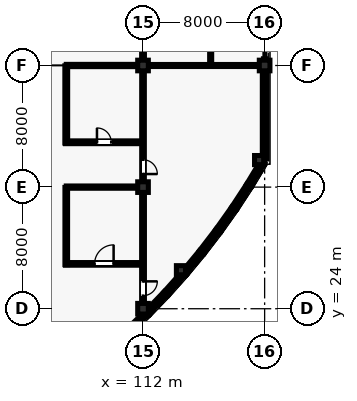
"""IFC4 building model, lengths in metres.
Left out: names, types, materials, properties, quantities, classifications, styles, units other than length and angle.
Written with IfcOpenShell. Run it as: python <this file> out.ifc"""

import sys

from ifc_helpers import new_model, si_unit, direction, frame, frame_2d, origin, origin_2d, place, context, subcontext, project, spatial, rectangle, extrude, element, fill, save


model = new_model("IFC4")
c1 = context("Model", 3, precision=1e-05, world=origin(), true_north=direction((0.0, 1.0)))
c2 = subcontext(c1, "Body", "Model", "MODEL_VIEW")
j1 = project(units=[si_unit("LENGTHUNIT", "METRE"), si_unit("PLANEANGLEUNIT", "RADIAN")], contexts=[c1])
p1 = place(None, origin())
s1 = spatial("IfcSite", under=j1, at=p1, CompositionType="ELEMENT")
p2 = place(p1, origin())
s2 = spatial("IfcBuilding", under=s1, at=p2, CompositionType="ELEMENT")
p3 = place(p2, origin())
s3 = spatial("IfcBuildingStorey", under=s2, at=p3, CompositionType="ELEMENT", Elevation=0.0)
for number, where, z_axis, x_axis in (
    (1, (112.0, 24.0, 0.0), (0.0, 0.0, 1.0), (1.0, 0.0, 0.0)),
    (2, (112.0, 32.0, 0.0), (0.0, 0.0, 1.0), (1.0, 0.0, 0.0)),
    (3, (112.0, 40.0, 0.0), (0.0, 0.0, 1.0), (1.0, 0.0, 0.0)),
    (4, (120.0, 40.0, 0.0), (0.0, 0.0, 1.0), (1.0, 0.0, 0.0)),
):
    element("IfcColumn", number, at=place(p3, frame(where, z_axis=z_axis, x_axis=x_axis)), inside=s3, PredefinedType="COLUMN", context=c2, shape_type="SweptSolid", body=[
        extrude(rectangle(XDim=0.7, YDim=0.7, at=origin_2d()), origin(), (0.0, 0.0, 1.0), 5.28),
    ])
for number, where, z_axis, x_axis in (
    (5, (114.495, 26.533, 0.0), (0.0, 0.0, 1.0), (1.0, 0.0, 0.0)),
    (6, (119.636, 33.779, 0.0), (0.0, 0.0, 1.0), (1.0, 0.0, 0.0)),
):
    element("IfcColumn", number, at=place(p3, frame(where, z_axis=z_axis, x_axis=x_axis)), inside=s3, PredefinedType="COLUMN", context=c2, shape_type="SweptSolid", body=[
        extrude(rectangle(XDim=0.6, YDim=0.6, at=origin_2d()), origin(), (0.0, 0.0, 1.0), 5.28),
    ])
p4 = place(p3, frame((110.971, 22.494, 0.0), z_axis=(0.0, 0.0, 1.0), x_axis=(0.720242191926, 0.693722700342, 0.0)))
e7 = element("IfcWall", 7, at=p4, inside=s3, PredefinedType="SOLIDWALL", context=c2, shape_type="SweptSolid", body=[
    extrude(rectangle(XDim=1.795, YDim=0.305, at=frame_2d((0.897, 0.0))), origin(), (0.0, 0.0, 1.0), 5.035),
])
p5 = place(p4, frame((0.347, 0.0, 0.9)))
e8 = element("IfcOpeningElement", 8, at=p5, cuts=e7, PredefinedType="OPENING", context=c2, shape_type="SweptSolid", body=[
    extrude(rectangle(XDim=1.1, YDim=2.1, at=frame_2d((0.55, 1.05))), frame((0.0, 0.162, 0.0), z_axis=(0.0, -1.0, 0.0), x_axis=(1.0, 0.0, 0.0)), (0.0, 0.0, 1.0), 0.325),
])
p6 = place(p3, frame((112.26, 23.736, 0.0), z_axis=(0.0, 0.0, 1.0), x_axis=(0.693722700342, 0.720242191926, 0.0)))
e9 = element("IfcWall", 9, at=p6, inside=s3, PredefinedType="SOLIDWALL", context=c2, shape_type="SweptSolid", body=[
    extrude(rectangle(XDim=1.795, YDim=0.305, at=frame_2d((0.897, 0.0))), origin(), (0.0, 0.0, 1.0), 5.035),
])
p7 = place(p6, frame((0.347, 0.0, 0.9)))
e10 = element("IfcOpeningElement", 10, at=p7, cuts=e9, PredefinedType="OPENING", context=c2, shape_type="SweptSolid", body=[
    extrude(rectangle(XDim=1.1, YDim=2.1, at=frame_2d((0.55, 1.05))), frame((0.0, 0.162, 0.0), z_axis=(0.0, -1.0, 0.0), x_axis=(1.0, 0.0, 0.0)), (0.0, 0.0, 1.0), 0.325),
])
p8 = place(p3, frame((113.502, 25.024, 0.0), z_axis=(0.0, 0.0, 1.0), x_axis=(0.666277888361, 0.745703543965, 0.0)))
e11 = element("IfcWall", 11, at=p8, inside=s3, PredefinedType="SOLIDWALL", context=c2, shape_type="SweptSolid", body=[
    extrude(rectangle(XDim=1.795, YDim=0.305, at=frame_2d((0.897, 0.0))), origin(), (0.0, 0.0, 1.0), 5.035),
])
p9 = place(p3, frame((114.694, 26.358, 0.0), z_axis=(0.0, 0.0, 1.0), x_axis=(0.638054732073, 0.769991012207, 0.0)))
e12 = element("IfcWall", 12, at=p9, inside=s3, PredefinedType="SOLIDWALL", context=c2, shape_type="SweptSolid", body=[
    extrude(rectangle(XDim=1.795, YDim=0.305, at=frame_2d((0.897, 0.0))), origin(), (0.0, 0.0, 1.0), 5.035),
])
p10 = place(p3, frame((115.836, 27.736, 0.0), z_axis=(0.0, 0.0, 1.0), x_axis=(0.608776981616, 0.793341406114, 0.0)))
e13 = element("IfcWall", 13, at=p10, inside=s3, PredefinedType="SOLIDWALL", context=c2, shape_type="SweptSolid", body=[
    extrude(rectangle(XDim=1.795, YDim=0.305, at=frame_2d((0.897, 0.0))), origin(), (0.0, 0.0, 1.0), 5.035),
])
p11 = place(p10, frame((0.347, 0.0, 0.9)))
e14 = element("IfcOpeningElement", 14, at=p11, cuts=e13, PredefinedType="OPENING", context=c2, shape_type="SweptSolid", body=[
    extrude(rectangle(XDim=1.1, YDim=2.1, at=frame_2d((0.55, 1.05))), frame((0.0, 0.162, 0.0), z_axis=(0.0, -1.0, 0.0), x_axis=(1.0, 0.0, 0.0)), (0.0, 0.0, 1.0), 0.325),
])
p12 = place(p3, frame((116.925, 29.156, 0.0), z_axis=(0.0, 0.0, 1.0), x_axis=(0.578662393636, 0.815567185578, 0.0)))
e15 = element("IfcWall", 15, at=p12, inside=s3, PredefinedType="SOLIDWALL", context=c2, shape_type="SweptSolid", body=[
    extrude(rectangle(XDim=1.795, YDim=0.305, at=frame_2d((0.897, 0.0))), origin(), (0.0, 0.0, 1.0), 5.035),
])
p13 = place(p12, frame((0.348, 0.0, 0.9)))
e16 = element("IfcOpeningElement", 16, at=p13, cuts=e15, PredefinedType="OPENING", context=c2, shape_type="SweptSolid", body=[
    extrude(rectangle(XDim=1.1, YDim=2.1, at=frame_2d((0.55, 1.05))), frame((0.0, 0.162, 0.0), z_axis=(0.0, -1.0, 0.0), x_axis=(1.0, 0.0, 0.0)), (0.0, 0.0, 1.0), 0.325),
])
p14 = place(p3, frame((117.961, 30.615, 0.0), z_axis=(0.0, 0.0, 1.0), x_axis=(0.547681678944, 0.836686786408, 0.0)))
e17 = element("IfcWall", 17, at=p14, inside=s3, PredefinedType="SOLIDWALL", context=c2, shape_type="SweptSolid", body=[
    extrude(rectangle(XDim=1.795, YDim=0.305, at=frame_2d((0.897, 0.0))), origin(), (0.0, 0.0, 1.0), 5.035),
])
p15 = place(p14, frame((0.347, 0.0, 0.9)))
e18 = element("IfcOpeningElement", 18, at=p15, cuts=e17, PredefinedType="OPENING", context=c2, shape_type="SweptSolid", body=[
    extrude(rectangle(XDim=1.1, YDim=2.1, at=frame_2d((0.55, 1.05))), frame((0.0, 0.162, 0.0), z_axis=(0.0, -1.0, 0.0), x_axis=(1.0, 0.0, 0.0)), (0.0, 0.0, 1.0), 0.325),
])
p16 = place(p3, frame((118.941, 32.112, 0.0), z_axis=(0.0, 0.0, 1.0), x_axis=(0.51607516088, 0.856543302071, 0.0)))
e19 = element("IfcWall", 19, at=p16, inside=s3, PredefinedType="SOLIDWALL", context=c2, shape_type="SweptSolid", body=[
    extrude(rectangle(XDim=1.795, YDim=0.305, at=frame_2d((0.897, 0.0))), origin(), (0.0, 0.0, 1.0), 5.035),
])
p17 = place(p3, frame((120.0, 33.854, 0.0), z_axis=(0.0, 0.0, 1.0), x_axis=(0.0, 1.0, 0.0)))
e20 = element("IfcWall", 20, at=p17, inside=s3, PredefinedType="SOLIDWALL", context=c2, shape_type="SweptSolid", body=[
    extrude(rectangle(XDim=5.811, YDim=0.305, at=frame_2d((2.905, 0.0))), origin(), (0.0, 0.0, 1.0), 5.035),
])
p18 = place(p17, frame((1.98, 0.0, 0.9)))
e21 = element("IfcOpeningElement", 21, at=p18, cuts=e20, PredefinedType="OPENING", context=c2, shape_type="SweptSolid", body=[
    extrude(rectangle(XDim=1.85, YDim=2.65, at=frame_2d((0.925, 1.325))), frame((0.0, 0.162, 0.0), z_axis=(0.0, -1.0, 0.0), x_axis=(1.0, 0.0, 0.0)), (0.0, 0.0, 1.0), 0.325),
])
p19 = place(p3, frame((106.9, 26.95, 0.0), z_axis=(0.0, 0.0, 1.0), x_axis=(1.0, 0.0, 0.0)))
e22 = element("IfcWall", 22, at=p19, inside=s3, PredefinedType="PARTITIONING", context=c2, shape_type="SweptSolid", body=[
    extrude(rectangle(XDim=5.08, YDim=0.175, at=frame_2d((2.54, 0.0))), origin(), (0.0, 0.0, 1.0), 4.412),
])
p20 = place(p19, frame((1.915, 0.0, 0.0)))
e23 = element("IfcOpeningElement", 23, at=p20, cuts=e22, PredefinedType="OPENING", context=c2, shape_type="SweptSolid", body=[
    extrude(rectangle(XDim=1.25, YDim=2.18, at=frame_2d((0.625, 1.09))), frame((0.0, 0.097, 0.0), z_axis=(0.0, -1.0, 0.0), x_axis=(1.0, 0.0, 0.0)), (0.0, 0.0, 1.0), 0.195),
])
p21 = place(p3, frame((106.95, 26.9, 0.0), z_axis=(0.0, 0.0, 1.0), x_axis=(0.0, 1.0, 0.0)))
e24 = element("IfcWall", 24, at=p21, inside=s3, PredefinedType="PARTITIONING", context=c2, shape_type="SweptSolid", body=[
    extrude(rectangle(XDim=5.08, YDim=0.175, at=frame_2d((2.54, 0.0))), origin(), (0.0, 0.0, 1.0), 4.403),
])
p22 = place(p3, frame((106.95, 32.0, 0.0), z_axis=(0.0, 0.0, 1.0), x_axis=(1.0, 0.0, 0.0)))
e25 = element("IfcWall", 25, at=p22, inside=s3, PredefinedType="PARTITIONING", context=c2, shape_type="SweptSolid", body=[
    extrude(rectangle(XDim=4.69, YDim=0.15, at=frame_2d((2.345, 0.0))), origin(), (0.0, 0.0, 1.0), 4.403),
])
p23 = place(p3, frame((106.9, 34.95, 0.0), z_axis=(0.0, 0.0, 1.0), x_axis=(1.0, 0.0, 0.0)))
e26 = element("IfcWall", 26, at=p23, inside=s3, PredefinedType="PARTITIONING", context=c2, shape_type="SweptSolid", body=[
    extrude(rectangle(XDim=5.08, YDim=0.185, at=frame_2d((2.54, 0.0))), origin(), (0.0, 0.0, 1.0), 4.404),
])
p24 = place(p23, frame((2.07, 0.0, 0.0)))
e27 = element("IfcOpeningElement", 27, at=p24, cuts=e26, PredefinedType="OPENING", context=c2, shape_type="SweptSolid", body=[
    extrude(rectangle(XDim=0.94, YDim=2.12, at=frame_2d((0.47, 1.06))), frame((0.0, 0.103, 0.0), z_axis=(0.0, -1.0, 0.0), x_axis=(1.0, 0.0, 0.0)), (0.0, 0.0, 1.0), 0.205),
])
p25 = place(p3, frame((106.95, 34.9, 0.0), z_axis=(0.0, 0.0, 1.0), x_axis=(0.0, 1.0, 0.0)))
e28 = element("IfcWall", 28, at=p25, inside=s3, PredefinedType="PARTITIONING", context=c2, shape_type="SweptSolid", body=[
    extrude(rectangle(XDim=5.08, YDim=0.185, at=frame_2d((2.54, 0.0))), origin(), (0.0, 0.0, 1.0), 4.336),
])
p26 = place(p3, frame((106.95, 40.0, 0.0), z_axis=(0.0, 0.0, 1.0), x_axis=(1.0, 0.0, 0.0)))
e29 = element("IfcWall", 29, at=p26, inside=s3, PredefinedType="PARTITIONING", context=c2, shape_type="SweptSolid", body=[
    extrude(rectangle(XDim=4.69, YDim=0.15, at=frame_2d((2.345, 0.0))), origin(), (0.0, 0.0, 1.0), 4.336),
])
p27 = place(p3, frame((112.0, 24.34, 0.0), z_axis=(0.0, 0.0, 1.0), x_axis=(0.0, 1.0, 0.0)))
e30 = element("IfcWall", 30, at=p27, inside=s3, PredefinedType="PARTITIONING", context=c2, shape_type="SweptSolid", body=[
    extrude(rectangle(XDim=7.32, YDim=0.185, at=frame_2d((3.66, 0.0))), origin(), (0.0, 0.0, 1.0), 4.412),
])
p28 = place(p27, frame((0.52, 0.0, 0.0)))
e31 = element("IfcOpeningElement", 31, at=p28, cuts=e30, PredefinedType="OPENING", context=c2, shape_type="SweptSolid", body=[
    extrude(rectangle(XDim=0.94, YDim=2.12, at=frame_2d((0.47, 1.06))), frame((0.0, 0.103, 0.0), z_axis=(0.0, -1.0, 0.0), x_axis=(1.0, 0.0, 0.0)), (0.0, 0.0, 1.0), 0.205),
])
p29 = place(p3, frame((112.0, 32.34, 0.0), z_axis=(0.0, 0.0, 1.0), x_axis=(0.0, 1.0, 0.0)))
e32 = element("IfcWall", 32, at=p29, inside=s3, PredefinedType="PARTITIONING", context=c2, shape_type="SweptSolid", body=[
    extrude(rectangle(XDim=7.32, YDim=0.175, at=frame_2d((3.66, 0.0))), origin(), (0.0, 0.0, 1.0), 4.404),
])
p30 = place(p29, frame((0.52, 0.0, 0.0)))
e33 = element("IfcOpeningElement", 33, at=p30, cuts=e32, PredefinedType="OPENING", context=c2, shape_type="SweptSolid", body=[
    extrude(rectangle(XDim=0.94, YDim=2.12, at=frame_2d((0.47, 1.06))), frame((0.0, 0.097, 0.0), z_axis=(0.0, -1.0, 0.0), x_axis=(1.0, 0.0, 0.0)), (0.0, 0.0, 1.0), 0.195),
])
p31 = place(p3, frame((112.0, 40.34, 0.0), z_axis=(0.0, 0.0, 1.0), x_axis=(0.0, 1.0, 0.0)))
e34 = element("IfcWall", 34, at=p31, inside=s3, PredefinedType="PARTITIONING", context=c2, shape_type="SweptSolid", body=[
    extrude(rectangle(XDim=7.27, YDim=0.185, at=frame_2d((3.635, 0.0))), origin(), (0.0, 0.0, 1.0), 4.471),
])
p32 = place(p31, frame((3.175, 0.0, 0.0)))
e35 = element("IfcOpeningElement", 35, at=p32, cuts=e34, PredefinedType="OPENING", context=c2, shape_type="SweptSolid", body=[
    extrude(rectangle(XDim=0.92, YDim=2.1, at=frame_2d((0.46, 1.05))), frame((0.0, 0.103, 0.0), z_axis=(0.0, -1.0, 0.0), x_axis=(1.0, 0.0, 0.0)), (0.0, 0.0, 1.0), 0.205),
])
p33 = place(p3, frame((112.34, 40.0, 0.0), z_axis=(0.0, 0.0, 1.0), x_axis=(1.0, 0.0, 0.0)))
e36 = element("IfcWall", 36, at=p33, inside=s3, PredefinedType="PARTITIONING", context=c2, shape_type="SweptSolid", body=[
    extrude(rectangle(XDim=7.32, YDim=0.135, at=frame_2d((3.66, 0.0))), origin(), (0.0, 0.0, 1.0), 4.404),
])
p34 = place(p3, frame((116.45, 40.02, 0.0), z_axis=(0.0, 0.0, 1.0), x_axis=(0.0, 1.0, 0.0)))
e37 = element("IfcWall", 37, at=p34, inside=s3, PredefinedType="PARTITIONING", context=c2, shape_type="SweptSolid", body=[
    extrude(rectangle(XDim=7.96, YDim=0.135, at=frame_2d((3.98, 0.0))), origin(), (0.0, 0.0, 1.0), 4.327),
])
p35 = place(p34, frame((3.49, 0.0, 0.0)))
e38 = element("IfcOpeningElement", 38, at=p35, cuts=e37, PredefinedType="OPENING", context=c2, shape_type="SweptSolid", body=[
    extrude(rectangle(XDim=0.98, YDim=2.15, at=frame_2d((0.49, 1.075))), frame((0.0, 0.077, 0.0), z_axis=(0.0, -1.0, 0.0), x_axis=(1.0, 0.0, 0.0)), (0.0, 0.0, 1.0), 0.155),
])
p36 = place(p5, origin())
e39 = element("IfcWindow", 39, at=p36, inside=s3, PartitioningType="SINGLE_PANEL", PredefinedType="WINDOW", context=c2, shape_type="SweptSolid", body=[
    extrude(rectangle(XDim=1.1, YDim=2.1, at=frame_2d((0.55, 1.05))), frame((0.0, 0.03, 0.0), z_axis=(0.0, -1.0, 0.0), x_axis=(1.0, 0.0, 0.0)), (0.0, 0.0, 1.0), 0.06),
])
fill(e8, e39)
p37 = place(p7, origin())
e40 = element("IfcWindow", 40, at=p37, inside=s3, PartitioningType="SINGLE_PANEL", PredefinedType="WINDOW", context=c2, shape_type="SweptSolid", body=[
    extrude(rectangle(XDim=1.1, YDim=2.1, at=frame_2d((0.55, 1.05))), frame((0.0, 0.03, 0.0), z_axis=(0.0, -1.0, 0.0), x_axis=(1.0, 0.0, 0.0)), (0.0, 0.0, 1.0), 0.06),
])
fill(e10, e40)
p38 = place(p11, origin())
e41 = element("IfcWindow", 41, at=p38, inside=s3, PartitioningType="SINGLE_PANEL", PredefinedType="WINDOW", context=c2, shape_type="SweptSolid", body=[
    extrude(rectangle(XDim=1.1, YDim=2.1, at=frame_2d((0.55, 1.05))), frame((0.0, 0.03, 0.0), z_axis=(0.0, -1.0, 0.0), x_axis=(1.0, 0.0, 0.0)), (0.0, 0.0, 1.0), 0.06),
])
fill(e14, e41)
p39 = place(p13, origin())
e42 = element("IfcWindow", 42, at=p39, inside=s3, PartitioningType="SINGLE_PANEL", PredefinedType="WINDOW", context=c2, shape_type="SweptSolid", body=[
    extrude(rectangle(XDim=1.1, YDim=2.1, at=frame_2d((0.55, 1.05))), frame((0.0, 0.03, 0.0), z_axis=(0.0, -1.0, 0.0), x_axis=(1.0, 0.0, 0.0)), (0.0, 0.0, 1.0), 0.06),
])
fill(e16, e42)
p40 = place(p15, origin())
e43 = element("IfcWindow", 43, at=p40, inside=s3, PartitioningType="SINGLE_PANEL", PredefinedType="WINDOW", context=c2, shape_type="SweptSolid", body=[
    extrude(rectangle(XDim=1.1, YDim=2.1, at=frame_2d((0.55, 1.05))), frame((0.0, 0.03, 0.0), z_axis=(0.0, -1.0, 0.0), x_axis=(1.0, 0.0, 0.0)), (0.0, 0.0, 1.0), 0.06),
])
fill(e18, e43)
p41 = place(p18, origin())
e44 = element("IfcWindow", 44, at=p41, inside=s3, PartitioningType="SINGLE_PANEL", PredefinedType="WINDOW", context=c2, shape_type="SweptSolid", body=[
    extrude(rectangle(XDim=1.85, YDim=2.65, at=frame_2d((0.925, 1.325))), frame((0.0, 0.03, 0.0), z_axis=(0.0, -1.0, 0.0), x_axis=(1.0, 0.0, 0.0)), (0.0, 0.0, 1.0), 0.06),
])
fill(e21, e44)
p42 = place(p20, origin())
e45 = element("IfcDoor", 45, at=p42, inside=s3, OperationType="SINGLE_SWING_RIGHT", PredefinedType="DOOR", context=c2, shape_type="SweptSolid", body=[
    extrude(rectangle(XDim=1.25, YDim=2.18, at=frame_2d((0.625, 1.09))), frame((0.0, 0.025, 0.0), z_axis=(0.0, -1.0, 0.0), x_axis=(1.0, 0.0, 0.0)), (0.0, 0.0, 1.0), 0.05),
])
fill(e23, e45)
p43 = place(p24, origin())
e46 = element("IfcDoor", 46, at=p43, inside=s3, OperationType="SINGLE_SWING_LEFT", PredefinedType="DOOR", context=c2, shape_type="SweptSolid", body=[
    extrude(rectangle(XDim=0.94, YDim=2.12, at=frame_2d((0.47, 1.06))), frame((0.0, 0.025, 0.0), z_axis=(0.0, -1.0, 0.0), x_axis=(1.0, 0.0, 0.0)), (0.0, 0.0, 1.0), 0.05),
])
fill(e27, e46)
p44 = place(p28, frame((0.94, 0.0, 0.0), z_axis=(0.0, 0.0, 1.0), x_axis=(-1.0, 0.0, 0.0)))
e47 = element("IfcDoor", 47, at=p44, inside=s3, OperationType="SINGLE_SWING_RIGHT", PredefinedType="DOOR", context=c2, shape_type="SweptSolid", body=[
    extrude(rectangle(XDim=0.94, YDim=2.12, at=frame_2d((0.47, 1.06))), frame((0.0, 0.025, 0.0), z_axis=(0.0, -1.0, 0.0), x_axis=(1.0, 0.0, 0.0)), (0.0, 0.0, 1.0), 0.05),
])
fill(e31, e47)
p45 = place(p30, frame((0.94, 0.0, 0.0), z_axis=(0.0, 0.0, 1.0), x_axis=(-1.0, 0.0, 0.0)))
e48 = element("IfcDoor", 48, at=p45, inside=s3, OperationType="SINGLE_SWING_LEFT", PredefinedType="DOOR", context=c2, shape_type="SweptSolid", body=[
    extrude(rectangle(XDim=0.94, YDim=2.12, at=frame_2d((0.47, 1.06))), frame((0.0, 0.025, 0.0), z_axis=(0.0, -1.0, 0.0), x_axis=(1.0, 0.0, 0.0)), (0.0, 0.0, 1.0), 0.05),
])
fill(e33, e48)
save(model, sys.argv[1])
